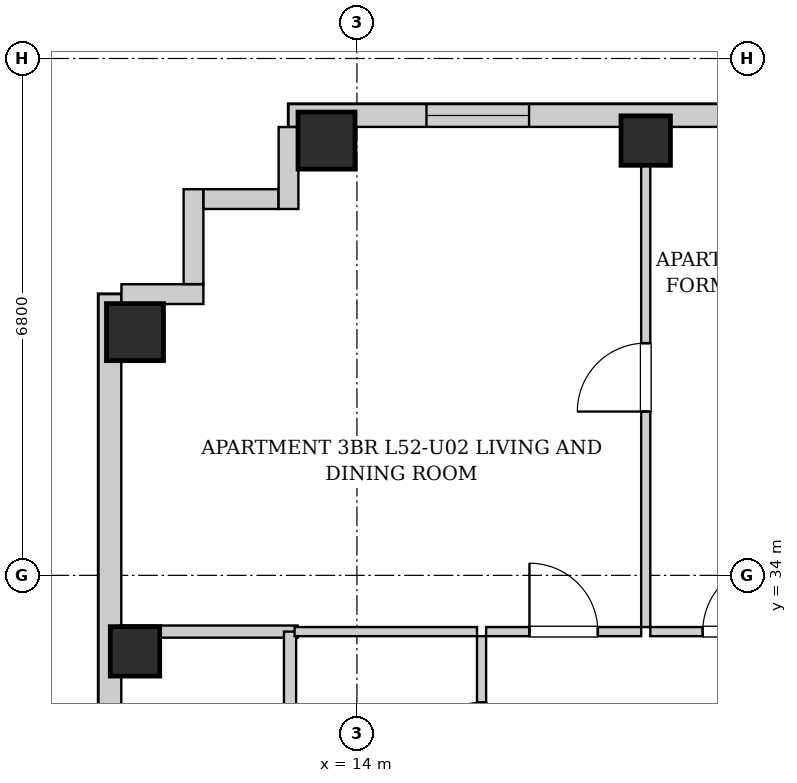
"""IFC4 building model, lengths in metres.
Left out: names, types, materials, properties, quantities, classifications, styles, units other than length and angle.
Written with IfcOpenShell. Run it as: python <this file> out.ifc"""

import sys

from ifc_helpers import new_model, si_unit, direction, frame, frame_2d, origin, origin_2d, place, context, subcontext, project, spatial, rectangle, extrude, element, fill, save


model = new_model("IFC4")
c1 = context("Model", 3, precision=1e-05, world=origin(), true_north=direction((0.0, 1.0)))
c2 = subcontext(c1, "Body", "Model", "MODEL_VIEW")
j1 = project(units=[si_unit("LENGTHUNIT", "METRE"), si_unit("PLANEANGLEUNIT", "RADIAN")], contexts=[c1])
p1 = place(None, origin())
s1 = spatial("IfcSite", under=j1, at=p1, CompositionType="ELEMENT")
p2 = place(p1, origin())
s2 = spatial("IfcBuilding", under=s1, at=p2, CompositionType="ELEMENT")
p3 = place(p2, frame((0.0, 0.0, 181.0)))
s3 = spatial("IfcBuildingStorey", under=s2, at=p3, CompositionType="ELEMENT", Elevation=181.0)
p4 = place(p3, frame((13.6, 39.72, 0.0), z_axis=(0.0, 0.0, 1.0), x_axis=(1.0, 0.0, 0.0)))
e1 = element("IfcColumn", 1, at=p4, inside=s3, PredefinedType="COLUMN", context=c2, shape_type="SweptSolid", body=[
    extrude(rectangle(XDim=0.75, YDim=0.75, at=origin_2d()), origin(), (0.0, 0.0, 1.0), 3.3),
])
for number, where, z_axis, x_axis in (
    (2, (17.8, 39.72, 0.0), (0.0, 0.0, 1.0), (1.0, 0.0, 0.0)),
    (3, (11.08, 33.0, 0.0), (0.0, 0.0, 1.0), (1.0, 0.0, 0.0)),
):
    element("IfcColumn", number, at=place(p3, frame(where, z_axis=z_axis, x_axis=x_axis)), inside=s3, PredefinedType="COLUMN", context=c2, shape_type="SweptSolid", body=[
        extrude(rectangle(XDim=0.65, YDim=0.65, at=origin_2d()), origin(), (0.0, 0.0, 1.0), 3.3),
    ])
p5 = place(p3, frame((11.08, 37.2, 0.0), z_axis=(0.0, 0.0, 1.0), x_axis=(1.0, 0.0, 0.0)))
e4 = element("IfcColumn", 4, at=p5, inside=s3, PredefinedType="COLUMN", context=c2, shape_type="SweptSolid", body=[
    extrude(rectangle(XDim=0.75, YDim=0.75, at=origin_2d()), origin(), (0.0, 0.0, 1.0), 3.3),
])
p6 = place(p3, frame((13.1, 40.05, 0.0), z_axis=(0.0, 0.0, 1.0), x_axis=(1.0, 0.0, 0.0)))
e5 = element("IfcWall", 5, at=p6, inside=s3, PredefinedType="SOLIDWALL", context=c2, shape_type="SweptSolid", body=[
    extrude(rectangle(XDim=17.5, YDim=0.3, at=frame_2d((8.75, 0.0))), origin(), (0.0, 0.0, 1.0), 3.04),
])
p7 = place(p6, frame((1.815, 0.0, 0.55)))
e6 = element("IfcOpeningElement", 6, at=p7, cuts=e5, PredefinedType="OPENING", context=c2, shape_type="SweptSolid", body=[
    extrude(rectangle(XDim=1.35, YDim=1.2, at=frame_2d((0.675, 0.6))), frame((0.0, 0.16, 0.0), z_axis=(0.0, -1.0, 0.0), x_axis=(1.0, 0.0, 0.0)), (0.0, 0.0, 1.0), 0.32),
])
p8 = place(p6, frame((6.189, 0.0, 0.55)))
e7 = element("IfcOpeningElement", 7, at=p8, cuts=e5, PredefinedType="OPENING", context=c2, shape_type="SweptSolid", body=[
    extrude(rectangle(XDim=1.35, YDim=1.2, at=frame_2d((0.675, 0.6))), frame((0.0, 0.16, 0.0), z_axis=(0.0, -1.0, 0.0), x_axis=(1.0, 0.0, 0.0)), (0.0, 0.0, 1.0), 0.32),
])
p9 = place(p6, frame((14.788, 0.0, 0.55)))
e8 = element("IfcOpeningElement", 8, at=p9, cuts=e5, PredefinedType="OPENING", context=c2, shape_type="SweptSolid", body=[
    extrude(rectangle(XDim=1.35, YDim=1.2, at=frame_2d((0.675, 0.6))), frame((0.0, 0.16, 0.0), z_axis=(0.0, -1.0, 0.0), x_axis=(1.0, 0.0, 0.0)), (0.0, 0.0, 1.0), 0.32),
])
p10 = place(p3, frame((10.75, 6.3, 0.0), z_axis=(0.0, 0.0, 1.0), x_axis=(0.0, 1.0, 0.0)))
e9 = element("IfcWall", 9, at=p10, inside=s3, PredefinedType="SOLIDWALL", context=c2, shape_type="SweptSolid", body=[
    extrude(rectangle(XDim=31.4, YDim=0.3, at=frame_2d((15.7, 0.0))), origin(), (0.0, 0.0, 1.0), 3.04),
])
p11 = place(p10, frame((1.653, 0.0, 0.55)))
e10 = element("IfcOpeningElement", 10, at=p11, cuts=e9, PredefinedType="OPENING", context=c2, shape_type="SweptSolid", body=[
    extrude(rectangle(XDim=1.35, YDim=1.2, at=frame_2d((0.675, 0.6))), frame((0.0, 0.16, 0.0), z_axis=(0.0, -1.0, 0.0), x_axis=(1.0, 0.0, 0.0)), (0.0, 0.0, 1.0), 0.32),
])
p12 = place(p10, frame((11.85, 0.0, 0.55)))
e11 = element("IfcOpeningElement", 11, at=p12, cuts=e9, PredefinedType="OPENING", context=c2, shape_type="SweptSolid", body=[
    extrude(rectangle(XDim=1.35, YDim=1.2, at=frame_2d((0.675, 0.6))), frame((0.0, 0.16, 0.0), z_axis=(0.0, -1.0, 0.0), x_axis=(1.0, 0.0, 0.0)), (0.0, 0.0, 1.0), 0.32),
])
p13 = place(p10, frame((9.185, 0.0, 0.55)))
e12 = element("IfcOpeningElement", 12, at=p13, cuts=e9, PredefinedType="OPENING", context=c2, shape_type="SweptSolid", body=[
    extrude(rectangle(XDim=1.35, YDim=1.2, at=frame_2d((0.675, 0.6))), frame((0.0, 0.16, 0.0), z_axis=(0.0, -1.0, 0.0), x_axis=(1.0, 0.0, 0.0)), (0.0, 0.0, 1.0), 0.32),
])
p14 = place(p10, frame((21.209, 0.0, 0.55)))
e13 = element("IfcOpeningElement", 13, at=p14, cuts=e9, PredefinedType="OPENING", context=c2, shape_type="SweptSolid", body=[
    extrude(rectangle(XDim=0.85, YDim=1.2, at=frame_2d((0.425, 0.6))), frame((0.0, 0.16, 0.0), z_axis=(0.0, -1.0, 0.0), x_axis=(1.0, 0.0, 0.0)), (0.0, 0.0, 1.0), 0.32),
])
p15 = place(p3, frame((10.902, 37.7, 0.0), z_axis=(0.0, 0.0, 1.0), x_axis=(1.0, 0.0, 0.0)))
e14 = element("IfcWall", 14, at=p15, inside=s3, PredefinedType="SOLIDWALL", context=c2, shape_type="SweptSolid", body=[
    extrude(rectangle(XDim=1.078, YDim=0.26, at=frame_2d((0.539, 0.0))), origin(), (0.0, 0.0, 1.0), 3.04),
])
p16 = place(p3, frame((11.85, 37.832, 0.0), z_axis=(0.0, 0.0, 1.0), x_axis=(0.0, 1.0, 0.0)))
e15 = element("IfcWall", 15, at=p16, inside=s3, PredefinedType="SOLIDWALL", context=c2, shape_type="SweptSolid", body=[
    extrude(rectangle(XDim=1.248, YDim=0.26, at=frame_2d((0.624, 0.0))), origin(), (0.0, 0.0, 1.0), 3.04),
])
p17 = place(p3, frame((11.982, 38.95, 0.0), z_axis=(0.0, 0.0, 1.0), x_axis=(1.0, 0.0, 0.0)))
e16 = element("IfcWall", 16, at=p17, inside=s3, PredefinedType="SOLIDWALL", context=c2, shape_type="SweptSolid", body=[
    extrude(rectangle(XDim=0.986, YDim=0.26, at=frame_2d((0.493, 0.0))), origin(), (0.0, 0.0, 1.0), 3.04),
])
p18 = place(p3, frame((13.1, 38.82, 0.0), z_axis=(0.0, 0.0, 1.0), x_axis=(0.0, 1.0, 0.0)))
e17 = element("IfcWall", 17, at=p18, inside=s3, PredefinedType="SOLIDWALL", context=c2, shape_type="SweptSolid", body=[
    extrude(rectangle(XDim=1.078, YDim=0.26, at=frame_2d((0.539, 0.0))), origin(), (0.0, 0.0, 1.0), 3.04),
])
p19 = place(p3, frame((10.88, 33.26, 0.0), z_axis=(0.0, 0.0, 1.0), x_axis=(1.0, 0.0, 0.0)))
e18 = element("IfcWall", 18, at=p19, inside=s3, PredefinedType="PARTITIONING", context=c2, shape_type="SweptSolid", body=[
    extrude(rectangle(XDim=2.34, YDim=0.16, at=frame_2d((1.17, 0.0))), origin(), (0.0, 0.0, 1.0), 3.04),
])
p20 = place(p3, frame((13.12, 30.6, 0.0), z_axis=(0.0, 0.0, 1.0), x_axis=(0.0, 1.0, 0.0)))
e19 = element("IfcWall", 19, at=p20, inside=s3, PredefinedType="PARTITIONING", context=c2, shape_type="SweptSolid", body=[
    extrude(rectangle(XDim=2.66, YDim=0.16, at=frame_2d((1.33, 0.0))), origin(), (0.0, 0.0, 1.0), 3.04),
])
p21 = place(p3, frame((15.64, 30.6, 0.0), z_axis=(0.0, 0.0, 1.0), x_axis=(0.0, 1.0, 0.0)))
e20 = element("IfcWall", 20, at=p21, inside=s3, PredefinedType="PARTITIONING", context=c2, shape_type="SweptSolid", body=[
    extrude(rectangle(XDim=2.6, YDim=0.12, at=frame_2d((1.3, 0.0))), origin(), (0.0, 0.0, 1.0), 3.04),
])
p22 = place(p21, frame((0.87, 0.0, 0.0)))
e21 = element("IfcOpeningElement", 21, at=p22, cuts=e20, PredefinedType="OPENING", context=c2, shape_type="SweptSolid", body=[
    extrude(rectangle(XDim=0.86, YDim=2.05, at=frame_2d((0.43, 1.025))), frame((0.0, 0.07, 0.0), z_axis=(0.0, -1.0, 0.0), x_axis=(1.0, 0.0, 0.0)), (0.0, 0.0, 1.0), 0.14),
])
p23 = place(p3, frame((13.18, 33.26, 0.0), z_axis=(0.0, 0.0, 1.0), x_axis=(1.0, 0.0, 0.0)))
e22 = element("IfcWall", 22, at=p23, inside=s3, PredefinedType="PARTITIONING", context=c2, shape_type="SweptSolid", body=[
    extrude(rectangle(XDim=2.4, YDim=0.12, at=frame_2d((1.2, 0.0))), origin(), (0.0, 0.0, 1.0), 3.04),
])
p24 = place(p3, frame((15.7, 33.26, 0.0), z_axis=(0.0, 0.0, 1.0), x_axis=(1.0, 0.0, 0.0)))
e23 = element("IfcWall", 23, at=p24, inside=s3, PredefinedType="PARTITIONING", context=c2, shape_type="SweptSolid", body=[
    extrude(rectangle(XDim=2.04, YDim=0.12, at=frame_2d((1.02, 0.0))), origin(), (0.0, 0.0, 1.0), 3.04),
])
p25 = place(p24, frame((0.57, 0.0, 0.0)))
e24 = element("IfcOpeningElement", 24, at=p25, cuts=e23, PredefinedType="OPENING", context=c2, shape_type="SweptSolid", body=[
    extrude(rectangle(XDim=0.9, YDim=2.05, at=frame_2d((0.45, 1.025))), frame((0.0, 0.07, 0.0), z_axis=(0.0, -1.0, 0.0), x_axis=(1.0, 0.0, 0.0)), (0.0, 0.0, 1.0), 0.14),
])
p26 = place(p3, frame((17.86, 33.26, 0.0), z_axis=(0.0, 0.0, 1.0), x_axis=(1.0, 0.0, 0.0)))
e25 = element("IfcWall", 25, at=p26, inside=s3, PredefinedType="PARTITIONING", context=c2, shape_type="SweptSolid", body=[
    extrude(rectangle(XDim=2.28, YDim=0.12, at=frame_2d((1.14, 0.0))), origin(), (0.0, 0.0, 1.0), 3.04),
])
p27 = place(p26, frame((0.69, 0.0, 0.0)))
e26 = element("IfcOpeningElement", 26, at=p27, cuts=e25, PredefinedType="OPENING", context=c2, shape_type="SweptSolid", body=[
    extrude(rectangle(XDim=0.9, YDim=2.05, at=frame_2d((0.45, 1.025))), frame((0.0, 0.07, 0.0), z_axis=(0.0, -1.0, 0.0), x_axis=(1.0, 0.0, 0.0)), (0.0, 0.0, 1.0), 0.14),
])
p28 = place(p3, frame((17.8, 33.32, 0.0), z_axis=(0.0, 0.0, 1.0), x_axis=(0.0, 1.0, 0.0)))
e27 = element("IfcWall", 27, at=p28, inside=s3, PredefinedType="PARTITIONING", context=c2, shape_type="SweptSolid", body=[
    extrude(rectangle(XDim=6.6, YDim=0.12, at=frame_2d((3.3, 0.0))), origin(), (0.0, 0.0, 1.0), 2.556),
])
p29 = place(p28, frame((2.835, 0.0, 0.0)))
e28 = element("IfcOpeningElement", 28, at=p29, cuts=e27, PredefinedType="OPENING", context=c2, shape_type="SweptSolid", body=[
    extrude(rectangle(XDim=0.9, YDim=2.05, at=frame_2d((0.45, 1.025))), frame((0.0, 0.07, 0.0), z_axis=(0.0, -1.0, 0.0), x_axis=(1.0, 0.0, 0.0)), (0.0, 0.0, 1.0), 0.14),
])
p30 = place(p22, origin())
e29 = element("IfcDoor", 29, at=p30, inside=s3, OperationType="SINGLE_SWING_LEFT", PredefinedType="DOOR", context=c2, shape_type="SweptSolid", body=[
    extrude(rectangle(XDim=0.86, YDim=2.05, at=frame_2d((0.43, 1.025))), frame((0.0, 0.025, 0.0), z_axis=(0.0, -1.0, 0.0), x_axis=(1.0, 0.0, 0.0)), (0.0, 0.0, 1.0), 0.05),
])
fill(e21, e29)
p31 = place(p25, origin())
e30 = element("IfcDoor", 30, at=p31, inside=s3, OperationType="SINGLE_SWING_LEFT", PredefinedType="DOOR", context=c2, shape_type="SweptSolid", body=[
    extrude(rectangle(XDim=0.9, YDim=2.05, at=frame_2d((0.45, 1.025))), frame((0.0, 0.025, 0.0), z_axis=(0.0, -1.0, 0.0), x_axis=(1.0, 0.0, 0.0)), (0.0, 0.0, 1.0), 0.05),
])
fill(e24, e30)
p32 = place(p27, origin())
e31 = element("IfcDoor", 31, at=p32, inside=s3, OperationType="SINGLE_SWING_RIGHT", PredefinedType="DOOR", context=c2, shape_type="SweptSolid", body=[
    extrude(rectangle(XDim=0.9, YDim=2.05, at=frame_2d((0.45, 1.025))), frame((0.0, 0.025, 0.0), z_axis=(0.0, -1.0, 0.0), x_axis=(1.0, 0.0, 0.0)), (0.0, 0.0, 1.0), 0.05),
])
fill(e26, e31)
p33 = place(p29, origin())
e32 = element("IfcDoor", 32, at=p33, inside=s3, OperationType="SINGLE_SWING_LEFT", PredefinedType="DOOR", context=c2, shape_type="SweptSolid", body=[
    extrude(rectangle(XDim=0.9, YDim=2.05, at=frame_2d((0.45, 1.025))), frame((0.0, 0.025, 0.0), z_axis=(0.0, -1.0, 0.0), x_axis=(1.0, 0.0, 0.0)), (0.0, 0.0, 1.0), 0.05),
])
fill(e28, e32)
p34 = place(p7, origin())
e33 = element("IfcWindow", 33, at=p34, inside=s3, PartitioningType="SINGLE_PANEL", PredefinedType="WINDOW", context=c2, shape_type="SweptSolid", body=[
    extrude(rectangle(XDim=1.35, YDim=1.2, at=frame_2d((0.675, 0.6))), frame((0.0, 0.03, 0.0), z_axis=(0.0, -1.0, 0.0), x_axis=(1.0, 0.0, 0.0)), (0.0, 0.0, 1.0), 0.06),
])
fill(e6, e33)
save(model, sys.argv[1])
